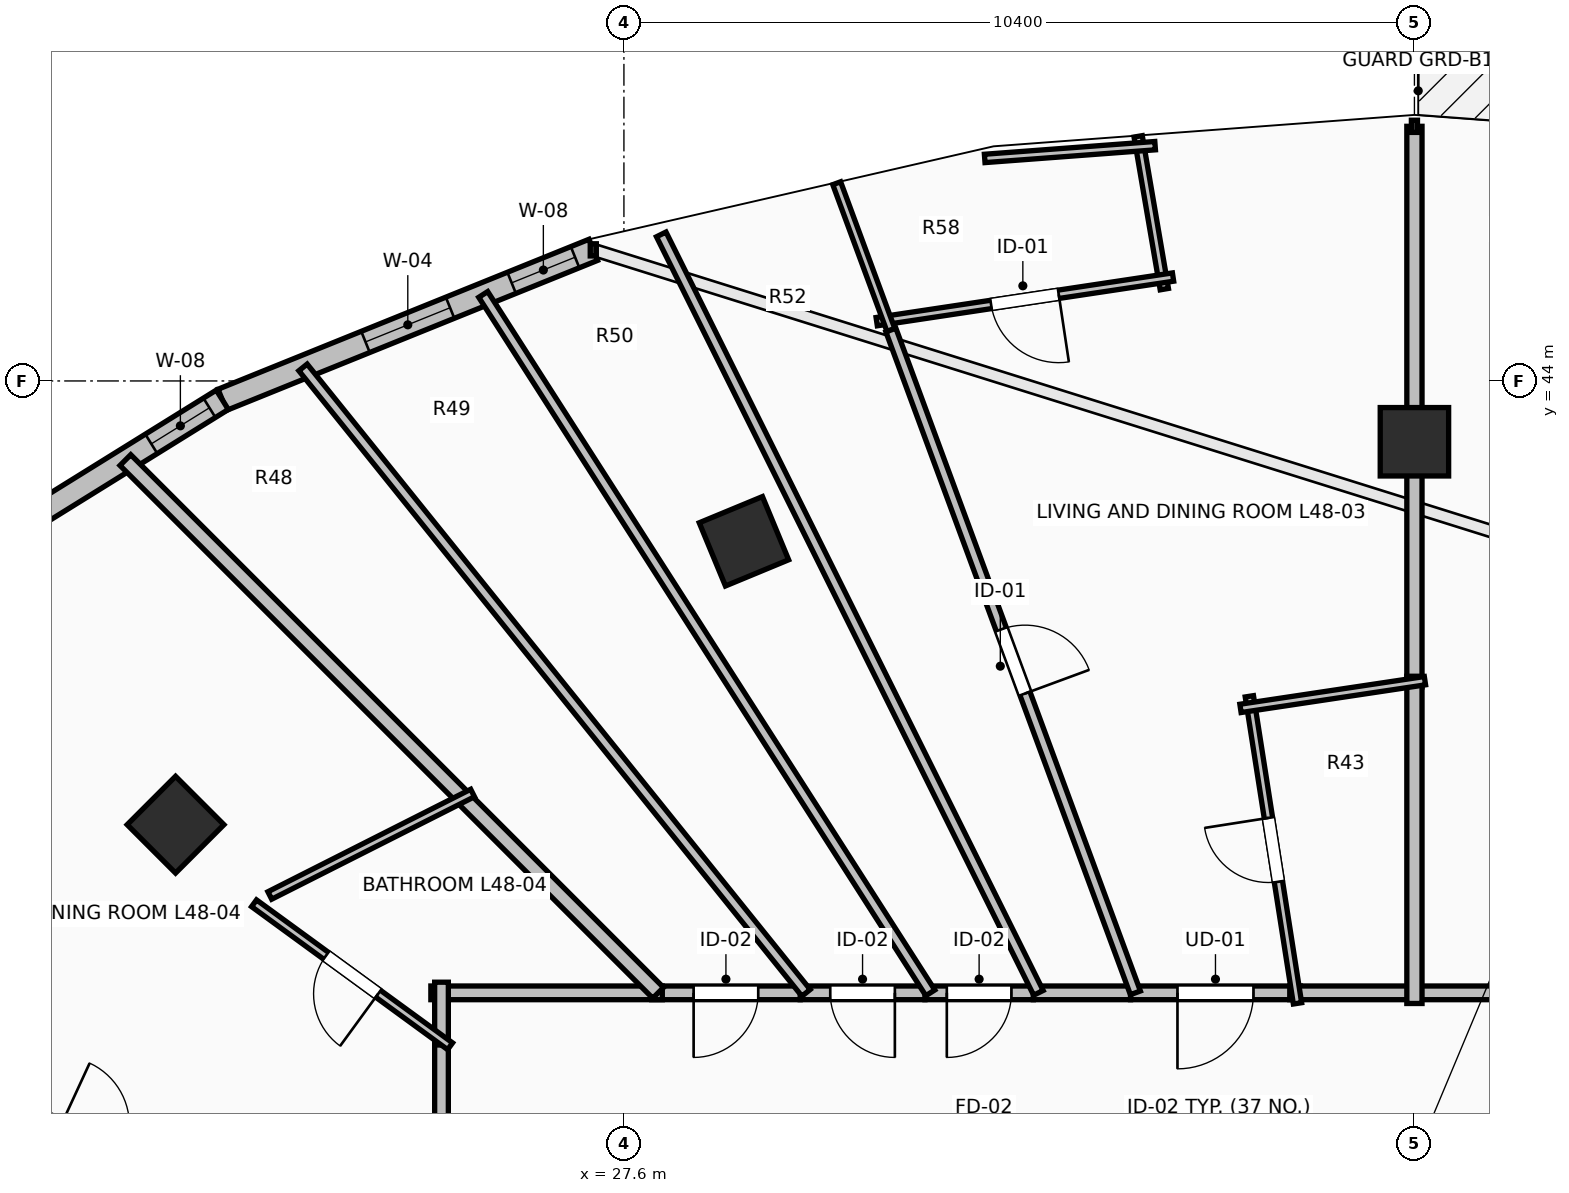
"""IFC4 building model, lengths in metres.
Left out: names, types, materials, properties, quantities, classifications, styles, units other than length and angle.
Written with IfcOpenShell. Run it as: python <this file> out.ifc"""

import sys

from ifc_helpers import new_model, si_unit, direction, frame, frame_2d, origin, origin_2d, place, context, subcontext, project, spatial, rectangle, extrude, element, fill, save


model = new_model("IFC4")
c1 = context("Model", 3, precision=1e-05, world=origin(), true_north=direction((0.0, 1.0)))
c2 = subcontext(c1, "Body", "Model", "MODEL_VIEW")
j1 = project(units=[si_unit("LENGTHUNIT", "METRE"), si_unit("PLANEANGLEUNIT", "RADIAN")], contexts=[c1])
p1 = place(None, origin())
s1 = spatial("IfcSite", under=j1, at=p1, CompositionType="ELEMENT")
p2 = place(p1, origin())
s2 = spatial("IfcBuilding", under=s1, at=p2, CompositionType="ELEMENT")
p3 = place(p2, frame((0.0, 0.0, 179.1)))
s3 = spatial("IfcBuildingStorey", under=s2, at=p3, CompositionType="ELEMENT", Elevation=179.1)
for number, where, z_axis, x_axis in (
    (1, (38.0, 43.2, 0.0), (0.0, 0.0, 1.0), (0.0, 1.0, 0.0)),
    (2, (29.179, 41.891, 0.0), (0.0, 0.0, 1.0), (-0.383, 0.924, 0.0)),
    (3, (21.701, 38.162, 0.0), (0.0, 0.0, 1.0), (-0.707, 0.707, 0.0)),
):
    element("IfcColumn", number, at=place(p3, frame(where, z_axis=z_axis, x_axis=x_axis)), inside=s3, PredefinedType="COLUMN", context=c2, shape_type="SweptSolid", body=[
        extrude(rectangle(XDim=0.9, YDim=0.9, at=origin_2d()), origin(), (0.0, 0.0, 1.0), 3.5),
    ])
p4 = place(p3, frame((27.197, 45.725, 0.0), z_axis=(0.0, 0.0, 1.0), x_axis=(-0.927111094334, -0.374786630981, 0.0)))
e4 = element("IfcWall", 4, at=p4, inside=s3, PredefinedType="STANDARD", context=c2, shape_type="SweptSolid", body=[
    extrude(rectangle(XDim=5.264, YDim=0.3, at=frame_2d((2.632, 0.0))), origin(), (0.0, 0.0, 1.0), 3.24),
])
p5 = place(p4, frame((0.258, 0.0, 0.85)))
e5 = element("IfcOpeningElement", 5, at=p5, cuts=e4, PredefinedType="OPENING", context=c2, shape_type="SweptSolid", body=[
    extrude(rectangle(XDim=0.9, YDim=1.8, at=frame_2d((0.45, 0.9))), frame((0.0, 0.165, 0.0), z_axis=(0.0, -1.0, 0.0), x_axis=(1.0, 0.0, 0.0)), (0.0, 0.0, 1.0), 0.33),
])
p6 = place(p4, frame((2.032, 0.0, 0.85)))
e6 = element("IfcOpeningElement", 6, at=p6, cuts=e4, PredefinedType="OPENING", context=c2, shape_type="SweptSolid", body=[
    extrude(rectangle(XDim=1.2, YDim=1.95, at=frame_2d((0.6, 0.975))), frame((0.0, 0.165, 0.0), z_axis=(0.0, -1.0, 0.0), x_axis=(1.0, 0.0, 0.0)), (0.0, 0.0, 1.0), 0.33),
])
p7 = place(p3, frame((22.316, 43.752, 0.0), z_axis=(0.0, 0.0, 1.0), x_axis=(-0.849647657754, -0.527350791858, 0.0)))
e7 = element("IfcWall", 7, at=p7, inside=s3, PredefinedType="STANDARD", context=c2, shape_type="SweptSolid", body=[
    extrude(rectangle(XDim=5.035, YDim=0.3, at=frame_2d((2.518, 0.0))), origin(), (0.0, 0.0, 1.0), 3.24),
])
p8 = place(p7, frame((0.199, 0.0, 0.85)))
e8 = element("IfcOpeningElement", 8, at=p8, cuts=e7, PredefinedType="OPENING", context=c2, shape_type="SweptSolid", body=[
    extrude(rectangle(XDim=0.9, YDim=1.8, at=frame_2d((0.45, 0.9))), frame((0.0, 0.165, 0.0), z_axis=(0.0, -1.0, 0.0), x_axis=(1.0, 0.0, 0.0)), (0.0, 0.0, 1.0), 0.33),
])
p9 = place(p3, frame((39.197, 35.95, 0.0), z_axis=(0.0, 0.0, 1.0), x_axis=(-1.0, 0.0, 0.0)))
e9 = element("IfcWall", 9, at=p9, inside=s3, PredefinedType="PARTITIONING", context=c2, shape_type="SweptSolid", body=[
    extrude(rectangle(XDim=1.257, YDim=0.18, at=frame_2d((0.628, 0.0))), origin(), (0.0, 0.0, 1.0), 2.922),
])
p10 = place(p3, frame((36.5, 35.95, 0.0), z_axis=(0.0, 0.0, 1.0), x_axis=(-1.0, 0.0, 0.0)))
e10 = element("IfcWall", 10, at=p10, inside=s3, PredefinedType="PARTITIONING", context=c2, shape_type="SweptSolid", body=[
    extrude(rectangle(XDim=2.235, YDim=0.18, at=frame_2d((1.118, 0.0))), origin(), (0.0, 0.0, 1.0), 2.922),
])
p11 = place(p10, frame((0.617, 0.0, 0.0)))
e11 = element("IfcOpeningElement", 11, at=p11, cuts=e10, PredefinedType="OPENING", context=c2, shape_type="SweptSolid", body=[
    extrude(rectangle(XDim=1.0, YDim=2.15, at=frame_2d((0.5, 1.075))), frame((0.0, 0.105, 0.0), z_axis=(0.0, -1.0, 0.0), x_axis=(1.0, 0.0, 0.0)), (0.0, 0.0, 1.0), 0.21),
])
p12 = place(p3, frame((38.08, 35.95, 0.0), z_axis=(0.0, 0.0, 1.0), x_axis=(-1.0, 0.0, 0.0)))
e12 = element("IfcWall", 12, at=p12, inside=s3, PredefinedType="PARTITIONING", context=c2, shape_type="SweptSolid", body=[
    extrude(rectangle(XDim=1.72, YDim=0.18, at=frame_2d((0.86, 0.0))), origin(), (0.0, 0.0, 1.0), 2.922),
])
p13 = place(p3, frame((34.265, 35.95, 0.0), z_axis=(0.0, 0.0, 1.0), x_axis=(-1.0, 0.0, 0.0)))
e13 = element("IfcWall", 13, at=p13, inside=s3, PredefinedType="PARTITIONING", context=c2, shape_type="SweptSolid", body=[
    extrude(rectangle(XDim=1.279, YDim=0.18, at=frame_2d((0.639, 0.0))), origin(), (0.0, 0.0, 1.0), 2.922),
])
p14 = place(p3, frame((32.986, 35.95, 0.0), z_axis=(0.0, 0.0, 1.0), x_axis=(-1.0, 0.0, 0.0)))
e14 = element("IfcWall", 14, at=p14, inside=s3, PredefinedType="PARTITIONING", context=c2, shape_type="SweptSolid", body=[
    extrude(rectangle(XDim=1.426, YDim=0.18, at=frame_2d((0.713, 0.0))), origin(), (0.0, 0.0, 1.0), 3.24),
])
p15 = place(p14, frame((0.288, 0.0, 0.0)))
e15 = element("IfcOpeningElement", 15, at=p15, cuts=e14, PredefinedType="OPENING", context=c2, shape_type="SweptSolid", body=[
    extrude(rectangle(XDim=0.85, YDim=2.1, at=frame_2d((0.425, 1.05))), frame((0.0, 0.105, 0.0), z_axis=(0.0, -1.0, 0.0), x_axis=(1.0, 0.0, 0.0)), (0.0, 0.0, 1.0), 0.21),
])
p16 = place(p3, frame((31.56, 35.95, 0.0), z_axis=(0.0, 0.0, 1.0), x_axis=(-1.0, 0.0, 0.0)))
e16 = element("IfcWall", 16, at=p16, inside=s3, PredefinedType="PARTITIONING", context=c2, shape_type="SweptSolid", body=[
    extrude(rectangle(XDim=1.641, YDim=0.18, at=frame_2d((0.821, 0.0))), origin(), (0.0, 0.0, 1.0), 2.432),
])
p17 = place(p16, frame((0.396, 0.0, 0.0)))
e17 = element("IfcOpeningElement", 17, at=p17, cuts=e16, PredefinedType="OPENING", context=c2, shape_type="SweptSolid", body=[
    extrude(rectangle(XDim=0.85, YDim=2.1, at=frame_2d((0.425, 1.05))), frame((0.0, 0.105, 0.0), z_axis=(0.0, -1.0, 0.0), x_axis=(1.0, 0.0, 0.0)), (0.0, 0.0, 1.0), 0.21),
])
p18 = place(p3, frame((29.919, 35.95, 0.0), z_axis=(0.0, 0.0, 1.0), x_axis=(-1.0, 0.0, 0.0)))
e18 = element("IfcWall", 18, at=p18, inside=s3, PredefinedType="PARTITIONING", context=c2, shape_type="SweptSolid", body=[
    extrude(rectangle(XDim=1.954, YDim=0.18, at=frame_2d((0.977, 0.0))), origin(), (0.0, 0.0, 1.0), 2.432),
])
p19 = place(p18, frame((0.552, 0.0, 0.0)))
e19 = element("IfcOpeningElement", 19, at=p19, cuts=e18, PredefinedType="OPENING", context=c2, shape_type="SweptSolid", body=[
    extrude(rectangle(XDim=0.85, YDim=2.1, at=frame_2d((0.425, 1.05))), frame((0.0, 0.105, 0.0), z_axis=(0.0, -1.0, 0.0), x_axis=(1.0, 0.0, 0.0)), (0.0, 0.0, 1.0), 0.21),
])
p20 = place(p3, frame((25.2, 35.404, 0.0), z_axis=(0.0, 0.0, 1.0), x_axis=(0.0, -1.0, 0.0)))
e20 = element("IfcWall", 20, at=p20, inside=s3, PredefinedType="PARTITIONING", context=c2, shape_type="SweptSolid", body=[
    extrude(rectangle(XDim=3.563, YDim=0.18, at=frame_2d((1.781, 0.0))), origin(), (0.0, 0.0, 1.0), 2.432),
])
p21 = place(p20, frame((1.281, 0.0, 0.0)))
e21 = element("IfcOpeningElement", 21, at=p21, cuts=e20, PredefinedType="OPENING", context=c2, shape_type="SweptSolid", body=[
    extrude(rectangle(XDim=1.0, YDim=2.15, at=frame_2d((0.5, 1.075))), frame((0.0, 0.105, 0.0), z_axis=(0.0, -1.0, 0.0), x_axis=(1.0, 0.0, 0.0)), (0.0, 0.0, 1.0), 0.21),
])
p22 = place(p3, frame((28.105, 35.95, 0.0), z_axis=(0.0, 0.0, 1.0), x_axis=(-1.0, 0.0, 0.0)))
e22 = element("IfcWall", 22, at=p22, inside=s3, PredefinedType="PARTITIONING", context=c2, shape_type="SweptSolid", body=[
    extrude(rectangle(XDim=3.045, YDim=0.18, at=frame_2d((1.522, 0.0))), origin(), (0.0, 0.0, 1.0), 2.432),
])
p23 = place(p3, frame((25.2, 36.09, 0.0), z_axis=(0.0, 0.0, 1.0), x_axis=(0.0, -1.0, 0.0)))
e23 = element("IfcWall", 23, at=p23, inside=s3, PredefinedType="PARTITIONING", context=c2, shape_type="SweptSolid", body=[
    extrude(rectangle(XDim=0.826, YDim=0.18, at=frame_2d((0.413, 0.0))), origin(), (0.0, 0.0, 1.0), 2.432),
])
p24 = place(p3, frame((38.0, 47.35, 0.0), z_axis=(0.0, 0.0, 1.0), x_axis=(0.0, -1.0, 0.0)))
e24 = element("IfcWall", 24, at=p24, inside=s3, PredefinedType="PARTITIONING", context=c2, shape_type="SweptSolid", body=[
    extrude(rectangle(XDim=7.375, YDim=0.2, at=frame_2d((3.688, 0.0))), origin(), (0.0, 0.0, 1.0), 3.24),
])
p25 = place(p3, frame((38.0, 40.115, 0.0), z_axis=(0.0, 0.0, 1.0), x_axis=(0.0, -1.0, 0.0)))
e25 = element("IfcWall", 25, at=p25, inside=s3, PredefinedType="PARTITIONING", context=c2, shape_type="SweptSolid", body=[
    extrude(rectangle(XDim=4.305, YDim=0.2, at=frame_2d((2.152, 0.0))), origin(), (0.0, 0.0, 1.0), 2.874),
])
p26 = place(p3, frame((36.462, 35.812, 0.0), z_axis=(0.0, 0.0, 1.0), x_axis=(-0.154883213323, 0.987932786292, 0.0)))
e26 = element("IfcWall", 26, at=p26, inside=s3, PredefinedType="PARTITIONING", context=c2, shape_type="SweptSolid", body=[
    extrude(rectangle(XDim=4.089, YDim=0.11, at=frame_2d((2.044, 0.0))), origin(), (0.0, 0.0, 1.0), 2.874),
])
p27 = place(p26, frame((1.619, 0.0, 0.0)))
e27 = element("IfcOpeningElement", 27, at=p27, cuts=e26, PredefinedType="OPENING", context=c2, shape_type="SweptSolid", body=[
    extrude(rectangle(XDim=0.85, YDim=2.1, at=frame_2d((0.425, 1.05))), frame((0.0, 0.07, 0.0), z_axis=(0.0, -1.0, 0.0), x_axis=(1.0, 0.0, 0.0)), (0.0, 0.0, 1.0), 0.14),
])
p28 = place(p3, frame((35.712, 39.692, 0.0), z_axis=(0.0, 0.0, 1.0), x_axis=(0.988892526147, 0.148632337431, 0.0)))
e28 = element("IfcWall", 28, at=p28, inside=s3, PredefinedType="PARTITIONING", context=c2, shape_type="SweptSolid", body=[
    extrude(rectangle(XDim=2.454, YDim=0.11, at=frame_2d((1.227, 0.0))), origin(), (0.0, 0.0, 1.0), 3.24),
])
p29 = place(p3, frame((34.365, 47.218, 0.0), z_axis=(0.0, 0.0, 1.0), x_axis=(0.168804313657, -0.985649584635, 0.0)))
e29 = element("IfcWall", 29, at=p29, inside=s3, PredefinedType="PARTITIONING", context=c2, shape_type="SweptSolid", body=[
    extrude(rectangle(XDim=2.039, YDim=0.11, at=frame_2d((1.02, 0.0))), origin(), (0.0, 0.0, 1.0), 3.24),
])
p30 = place(p3, frame((34.824, 45.367, 0.0), z_axis=(0.0, 0.0, 1.0), x_axis=(-0.988877230123, -0.148734070555, 0.0)))
e30 = element("IfcWall", 30, at=p30, inside=s3, PredefinedType="PARTITIONING", context=c2, shape_type="SweptSolid", body=[
    extrude(rectangle(XDim=3.943, YDim=0.11, at=frame_2d((1.971, 0.0))), origin(), (0.0, 0.0, 1.0), 3.24),
])
p31 = place(p30, frame((1.521, 0.0, 0.0)))
e31 = element("IfcOpeningElement", 31, at=p31, cuts=e30, PredefinedType="OPENING", context=c2, shape_type="SweptSolid", body=[
    extrude(rectangle(XDim=0.9, YDim=2.1, at=frame_2d((0.45, 1.05))), frame((0.0, 0.07, 0.0), z_axis=(0.0, -1.0, 0.0), x_axis=(1.0, 0.0, 0.0)), (0.0, 0.0, 1.0), 0.14),
])
p32 = place(p3, frame((31.113, 44.67, 0.0), z_axis=(0.0, 0.0, 1.0), x_axis=(-0.346337161188, 0.938110105894, 0.0)))
e32 = element("IfcWall", 32, at=p32, inside=s3, PredefinedType="PARTITIONING", context=c2, shape_type="SweptSolid", body=[
    extrude(rectangle(XDim=2.059, YDim=0.11, at=frame_2d((1.03, 0.0))), origin(), (0.0, 0.0, 1.0), 3.24),
])
p33 = place(p3, frame((34.589, 47.095, 0.0), z_axis=(0.0, 0.0, 1.0), x_axis=(-0.997205784552, -0.074703569226, 0.0)))
e33 = element("IfcWall", 33, at=p33, inside=s3, PredefinedType="PARTITIONING", context=c2, shape_type="SweptSolid", body=[
    extrude(rectangle(XDim=2.249, YDim=0.11, at=frame_2d((1.124, 0.0))), origin(), (0.0, 0.0, 1.0), 3.24),
])
p34 = place(p3, frame((31.112, 44.67, 0.0), z_axis=(0.0, 0.0, 1.0), x_axis=(0.346109472243, -0.938194134081, 0.0)))
e34 = element("IfcWall", 34, at=p34, inside=s3, PredefinedType="PARTITIONING", context=c2, shape_type="SweptSolid", body=[
    extrude(rectangle(XDim=9.294, YDim=0.14, at=frame_2d((4.647, 0.0))), origin(), (0.0, 0.0, 1.0), 2.432),
])
p35 = place(p34, frame((4.197, 0.0, 0.0)))
e35 = element("IfcOpeningElement", 35, at=p35, cuts=e34, PredefinedType="OPENING", context=c2, shape_type="SweptSolid", body=[
    extrude(rectangle(XDim=0.9, YDim=2.1, at=frame_2d((0.45, 1.05))), frame((0.0, 0.085, 0.0), z_axis=(0.0, -1.0, 0.0), x_axis=(1.0, 0.0, 0.0)), (0.0, 0.0, 1.0), 0.17),
])
p36 = place(p3, frame((28.091, 45.928, 0.0), z_axis=(0.0, 0.0, 1.0), x_axis=(0.445267068418, -0.895397809793, 0.0)))
e36 = element("IfcWall", 36, at=p36, inside=s3, PredefinedType="PARTITIONING", context=c2, shape_type="SweptSolid", body=[
    extrude(rectangle(XDim=11.144, YDim=0.14, at=frame_2d((5.572, 0.0))), origin(), (0.0, 0.0, 1.0), 2.432),
])
p37 = place(p3, frame((25.749, 45.138, 0.0), z_axis=(0.0, 0.0, 1.0), x_axis=(0.539168632786, -0.842197830335, 0.0)))
e37 = element("IfcWall", 37, at=p37, inside=s3, PredefinedType="PARTITIONING", context=c2, shape_type="SweptSolid", body=[
    extrude(rectangle(XDim=10.909, YDim=0.14, at=frame_2d((5.455, 0.0))), origin(), (0.0, 0.0, 1.0), 2.432),
])
p38 = place(p3, frame((23.378, 44.178, 0.0), z_axis=(0.0, 0.0, 1.0), x_axis=(0.626756813732, -0.779214923137, 0.0)))
e38 = element("IfcWall", 38, at=p38, inside=s3, PredefinedType="PARTITIONING", context=c2, shape_type="SweptSolid", body=[
    extrude(rectangle(XDim=10.559, YDim=0.14, at=frame_2d((5.28, 0.0))), origin(), (0.0, 0.0, 1.0), 2.432),
])
p39 = place(p3, frame((21.041, 42.959, 0.0), z_axis=(0.0, 0.0, 1.0), x_axis=(0.707106781187, -0.707106781187, 0.0)))
e39 = element("IfcWall", 39, at=p39, inside=s3, PredefinedType="PARTITIONING", context=c2, shape_type="SweptSolid", body=[
    extrude(rectangle(XDim=9.912, YDim=0.2, at=frame_2d((4.956, 0.0))), origin(), (0.0, 0.0, 1.0), 2.432),
])
p40 = place(p3, frame((25.313, 35.248, 0.0), z_axis=(0.0, 0.0, 1.0), x_axis=(-0.807968083988, 0.58922625133, 0.0)))
e40 = element("IfcWall", 40, at=p40, inside=s3, PredefinedType="PARTITIONING", context=c2, shape_type="SweptSolid", body=[
    extrude(rectangle(XDim=3.192, YDim=0.11, at=frame_2d((1.596, 0.0))), origin(), (0.0, 0.0, 1.0), 2.432),
])
p41 = place(p40, frame((1.171, 0.0, 0.0)))
e41 = element("IfcOpeningElement", 41, at=p41, cuts=e40, PredefinedType="OPENING", context=c2, shape_type="SweptSolid", body=[
    extrude(rectangle(XDim=0.85, YDim=2.1, at=frame_2d((0.425, 1.05))), frame((0.0, 0.07, 0.0), z_axis=(0.0, -1.0, 0.0), x_axis=(1.0, 0.0, 0.0)), (0.0, 0.0, 1.0), 0.14),
])
p42 = place(p3, frame((22.941, 37.231, 0.0), z_axis=(0.0, 0.0, 1.0), x_axis=(0.892507731149, 0.451032094024, 0.0)))
e42 = element("IfcWall", 42, at=p42, inside=s3, PredefinedType="PARTITIONING", context=c2, shape_type="SweptSolid", body=[
    extrude(rectangle(XDim=2.989, YDim=0.11, at=frame_2d((1.495, 0.0))), origin(), (0.0, 0.0, 1.0), 2.432),
])
p43 = place(p3, frame((16.006, 36.139, 0.0), z_axis=(0.0, 0.0, 1.0), x_axis=(0.908157621609, -0.41862839645, 0.0)))
e43 = element("IfcWall", 43, at=p43, inside=s3, PredefinedType="PARTITIONING", context=c2, shape_type="SweptSolid", body=[
    extrude(rectangle(XDim=10.124, YDim=0.14, at=frame_2d((5.062, 0.0))), origin(), (0.0, 0.0, 1.0), 2.774),
])
p44 = place(p43, frame((4.612, 0.0, 0.0)))
e44 = element("IfcOpeningElement", 44, at=p44, cuts=e43, PredefinedType="OPENING", context=c2, shape_type="SweptSolid", body=[
    extrude(rectangle(XDim=0.9, YDim=2.1, at=frame_2d((0.45, 1.05))), frame((0.0, 0.085, 0.0), z_axis=(0.0, -1.0, 0.0), x_axis=(1.0, 0.0, 0.0)), (0.0, 0.0, 1.0), 0.17),
])
p45 = place(p3, frame((12.609, 35.141, 0.0), z_axis=(0.0, 0.0, 1.0), x_axis=(0.940877411069, -0.338747246985, 0.0)))
e45 = element("IfcWall", 45, at=p45, inside=s3, PredefinedType="PARTITIONING", context=c2, shape_type="SweptSolid", body=[
    extrude(rectangle(XDim=13.382, YDim=0.14, at=frame_2d((6.691, 0.0))), origin(), (0.0, 0.0, 1.0), 2.774),
])
p46 = place(p45, frame((6.266, 0.0, 0.0)))
e46 = element("IfcOpeningElement", 46, at=p46, cuts=e45, PredefinedType="OPENING", context=c2, shape_type="SweptSolid", body=[
    extrude(rectangle(XDim=0.85, YDim=2.1, at=frame_2d((0.425, 1.05))), frame((0.0, 0.085, 0.0), z_axis=(0.0, -1.0, 0.0), x_axis=(1.0, 0.0, 0.0)), (0.0, 0.0, 1.0), 0.17),
])
p47 = place(p5, origin())
e47 = element("IfcWindow", 47, at=p47, inside=s3, PartitioningType="SINGLE_PANEL", PredefinedType="WINDOW", context=c2, shape_type="SweptSolid", body=[
    extrude(rectangle(XDim=0.9, YDim=1.8, at=frame_2d((0.45, 0.9))), frame((0.0, 0.03, 0.0), z_axis=(0.0, -1.0, 0.0), x_axis=(1.0, 0.0, 0.0)), (0.0, 0.0, 1.0), 0.06),
])
fill(e5, e47)
p48 = place(p6, origin())
e48 = element("IfcWindow", 48, at=p48, inside=s3, PartitioningType="SINGLE_PANEL", PredefinedType="WINDOW", context=c2, shape_type="SweptSolid", body=[
    extrude(rectangle(XDim=1.2, YDim=1.95, at=frame_2d((0.6, 0.975))), frame((0.0, 0.03, 0.0), z_axis=(0.0, -1.0, 0.0), x_axis=(1.0, 0.0, 0.0)), (0.0, 0.0, 1.0), 0.06),
])
fill(e6, e48)
p49 = place(p8, origin())
e49 = element("IfcWindow", 49, at=p49, inside=s3, PartitioningType="SINGLE_PANEL", PredefinedType="WINDOW", context=c2, shape_type="SweptSolid", body=[
    extrude(rectangle(XDim=0.9, YDim=1.8, at=frame_2d((0.45, 0.9))), frame((0.0, 0.03, 0.0), z_axis=(0.0, -1.0, 0.0), x_axis=(1.0, 0.0, 0.0)), (0.0, 0.0, 1.0), 0.06),
])
fill(e8, e49)
p50 = place(p11, origin())
e50 = element("IfcDoor", 50, at=p50, inside=s3, OperationType="SINGLE_SWING_RIGHT", PredefinedType="DOOR", context=c2, shape_type="SweptSolid", body=[
    extrude(rectangle(XDim=1.0, YDim=2.15, at=frame_2d((0.5, 1.075))), frame((0.0, 0.025, 0.0), z_axis=(0.0, -1.0, 0.0), x_axis=(1.0, 0.0, 0.0)), (0.0, 0.0, 1.0), 0.05),
])
fill(e11, e50)
p51 = place(p27, origin())
e51 = element("IfcDoor", 51, at=p51, inside=s3, OperationType="SINGLE_SWING_RIGHT", PredefinedType="DOOR", context=c2, shape_type="SweptSolid", body=[
    extrude(rectangle(XDim=0.85, YDim=2.1, at=frame_2d((0.425, 1.05))), frame((0.0, 0.025, 0.0), z_axis=(0.0, -1.0, 0.0), x_axis=(1.0, 0.0, 0.0)), (0.0, 0.0, 1.0), 0.05),
])
fill(e27, e51)
p52 = place(p31, origin())
e52 = element("IfcDoor", 52, at=p52, inside=s3, OperationType="SINGLE_SWING_LEFT", PredefinedType="DOOR", context=c2, shape_type="SweptSolid", body=[
    extrude(rectangle(XDim=0.9, YDim=2.1, at=frame_2d((0.45, 1.05))), frame((0.0, 0.025, 0.0), z_axis=(0.0, -1.0, 0.0), x_axis=(1.0, 0.0, 0.0)), (0.0, 0.0, 1.0), 0.05),
])
fill(e31, e52)
p53 = place(p35, origin())
e53 = element("IfcDoor", 53, at=p53, inside=s3, OperationType="SINGLE_SWING_RIGHT", PredefinedType="DOOR", context=c2, shape_type="SweptSolid", body=[
    extrude(rectangle(XDim=0.9, YDim=2.1, at=frame_2d((0.45, 1.05))), frame((0.0, 0.025, 0.0), z_axis=(0.0, -1.0, 0.0), x_axis=(1.0, 0.0, 0.0)), (0.0, 0.0, 1.0), 0.05),
])
fill(e35, e53)
p54 = place(p41, origin())
e54 = element("IfcDoor", 54, at=p54, inside=s3, OperationType="SINGLE_SWING_LEFT", PredefinedType="DOOR", context=c2, shape_type="SweptSolid", body=[
    extrude(rectangle(XDim=0.85, YDim=2.1, at=frame_2d((0.425, 1.05))), frame((0.0, 0.025, 0.0), z_axis=(0.0, -1.0, 0.0), x_axis=(1.0, 0.0, 0.0)), (0.0, 0.0, 1.0), 0.05),
])
fill(e41, e54)
p55 = place(p15, origin())
e55 = element("IfcDoor", 55, at=p55, inside=s3, OperationType="SINGLE_SWING_RIGHT", PredefinedType="DOOR", context=c2, shape_type="SweptSolid", body=[
    extrude(rectangle(XDim=0.85, YDim=2.1, at=frame_2d((0.425, 1.05))), frame((0.0, 0.025, 0.0), z_axis=(0.0, -1.0, 0.0), x_axis=(1.0, 0.0, 0.0)), (0.0, 0.0, 1.0), 0.05),
])
fill(e15, e55)
p56 = place(p17, origin())
e56 = element("IfcDoor", 56, at=p56, inside=s3, OperationType="SINGLE_SWING_LEFT", PredefinedType="DOOR", context=c2, shape_type="SweptSolid", body=[
    extrude(rectangle(XDim=0.85, YDim=2.1, at=frame_2d((0.425, 1.05))), frame((0.0, 0.025, 0.0), z_axis=(0.0, -1.0, 0.0), x_axis=(1.0, 0.0, 0.0)), (0.0, 0.0, 1.0), 0.05),
])
fill(e17, e56)
p57 = place(p19, origin())
e57 = element("IfcDoor", 57, at=p57, inside=s3, OperationType="SINGLE_SWING_RIGHT", PredefinedType="DOOR", context=c2, shape_type="SweptSolid", body=[
    extrude(rectangle(XDim=0.85, YDim=2.1, at=frame_2d((0.425, 1.05))), frame((0.0, 0.025, 0.0), z_axis=(0.0, -1.0, 0.0), x_axis=(1.0, 0.0, 0.0)), (0.0, 0.0, 1.0), 0.05),
])
fill(e19, e57)
save(model, sys.argv[1])
